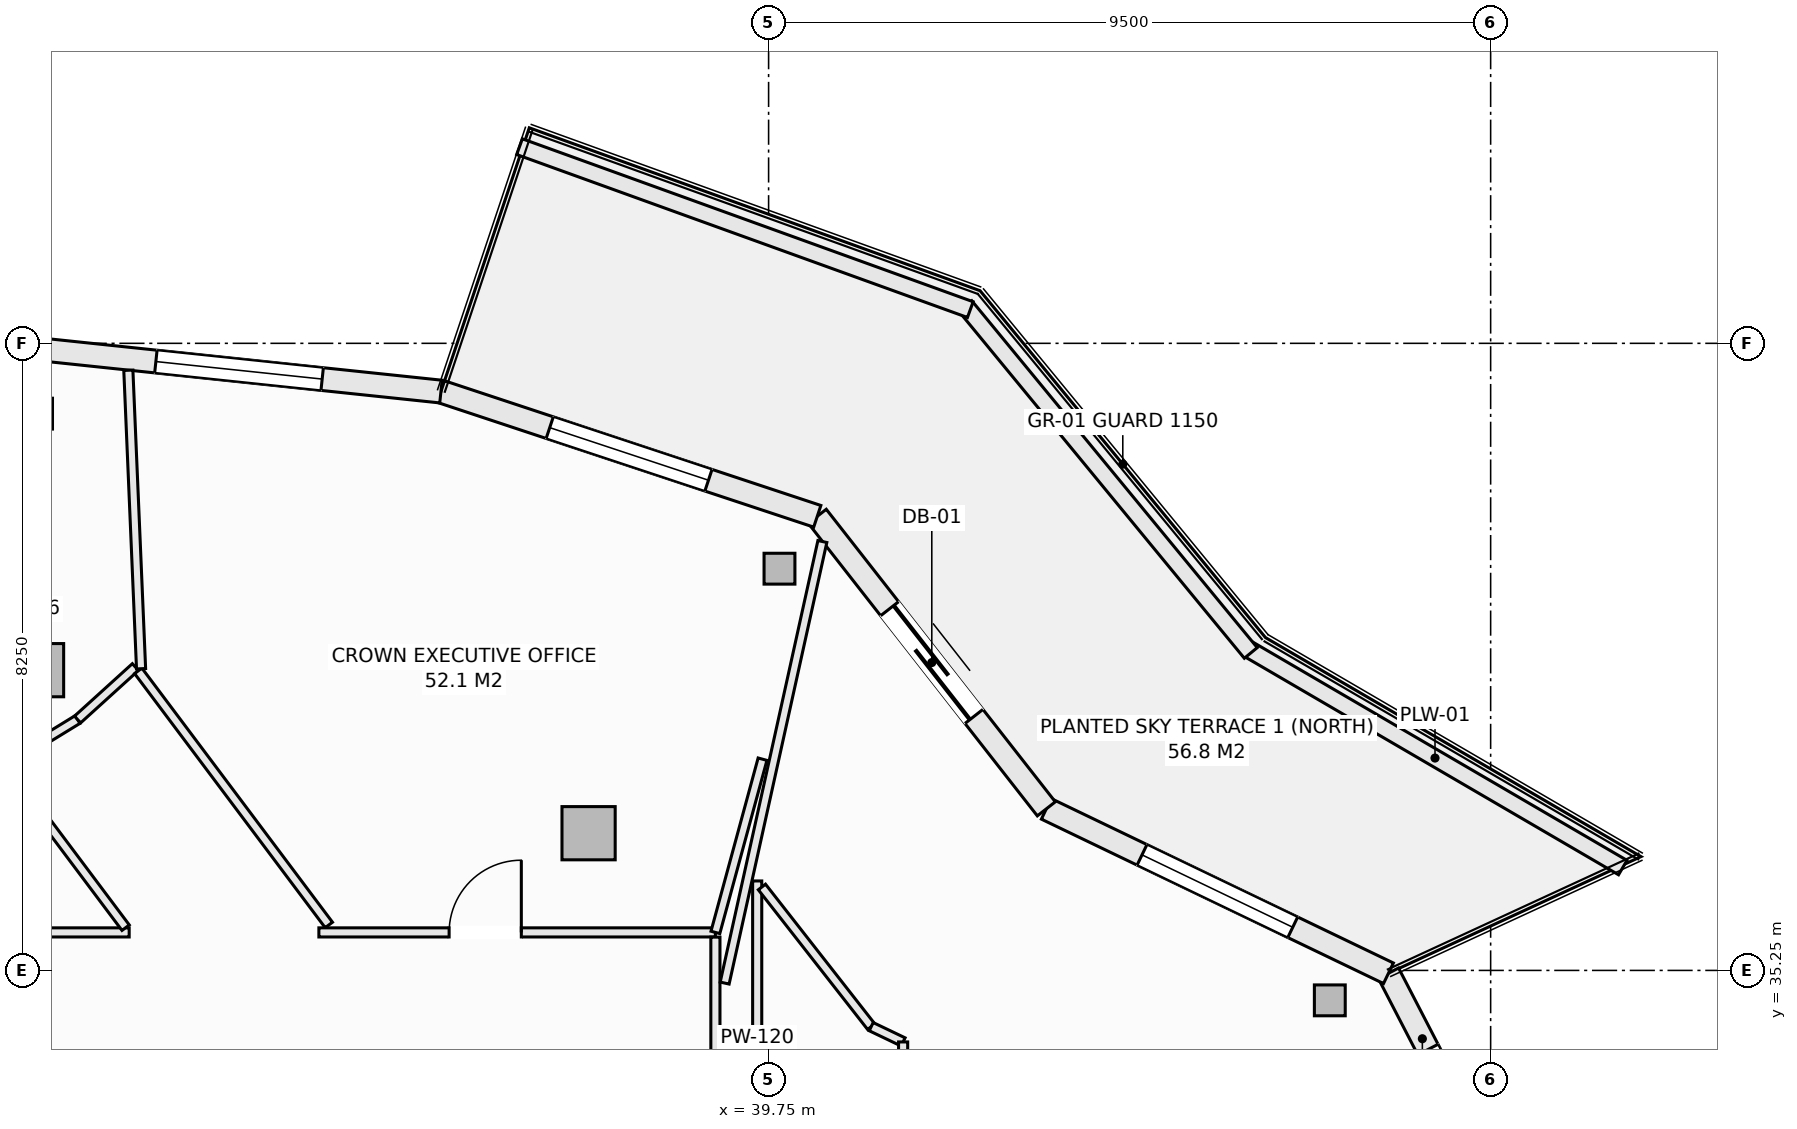
"""IFC4 building model, lengths in metres.
Left out: names, types, materials, properties, quantities, classifications, styles, units other than length and angle.
Written with IfcOpenShell. Run it as: python <this file> out.ifc"""

import sys

from ifc_helpers import new_model, si_unit, direction, frame, frame_2d, origin, origin_2d, place, context, subcontext, project, spatial, rectangle, hollow_rectangle, extrude, element, fill, save


model = new_model("IFC4")
c1 = context("Model", 3, precision=1e-05, world=origin(), true_north=direction((0.0, 1.0)))
c2 = subcontext(c1, "Body", "Model", "MODEL_VIEW")
j1 = project(units=[si_unit("LENGTHUNIT", "METRE"), si_unit("PLANEANGLEUNIT", "RADIAN")], contexts=[c1])
p1 = place(None, origin())
s1 = spatial("IfcSite", under=j1, at=p1, CompositionType="ELEMENT")
p2 = place(p1, origin())
s2 = spatial("IfcBuilding", under=s1, at=p2, CompositionType="ELEMENT")
p3 = place(p2, frame((0.0, 0.0, 262.4)))
s3 = spatial("IfcBuildingStorey", under=s2, at=p3, CompositionType="ELEMENT", Elevation=262.4)
for number, where, z_axis, x_axis in (
    (1, (47.134, 34.856, -0.27), (0.0, 0.0, 1.0), (1.0, 0.0, 0.0)),
    (2, (39.893, 40.535, -0.27), (0.0, 0.0, 1.0), (1.0, 0.0, 0.0)),
    (3, (30.125, 42.575, -0.27), (0.0, 0.0, 1.0), (1.0, 0.0, 0.0)),
):
    element("IfcColumn", number, at=place(p3, frame(where, z_axis=z_axis, x_axis=x_axis)), inside=s3, PredefinedType="COLUMN", context=c2, shape_type="SweptSolid", body=[
        extrude(hollow_rectangle(XDim=0.406, YDim=0.406, WallThickness=0.016, at=origin_2d()), origin(), (0.0, 0.0, 1.0), 3.3),
    ])
for number, where, z_axis, x_axis in (
    (4, (37.382, 37.055, -0.27), (0.0, 0.0, 1.0), (1.0, 0.0, 0.0)),
    (5, (30.125, 39.2, -0.27), (0.0, 0.0, 1.0), (1.0, 0.0, 0.0)),
):
    element("IfcColumn", number, at=place(p3, frame(where, z_axis=z_axis, x_axis=x_axis)), inside=s3, PredefinedType="COLUMN", context=c2, shape_type="SweptSolid", body=[
        extrude(rectangle(XDim=0.7, YDim=0.7, at=origin_2d()), origin(), (0.0, 0.0, 1.0), 3.3),
    ])
p4 = place(p3, frame((47.906, 35.212, 0.0), z_axis=(0.0, 0.0, 1.0), x_axis=(0.459801070243, -0.888021945564, 0.0)))
e6 = element("IfcWall", 6, at=p4, inside=s3, PredefinedType="SOLIDWALL", context=c2, shape_type="SweptSolid", body=[
    extrude(rectangle(XDim=4.461, YDim=0.3, at=frame_2d((2.23, 0.0))), origin(), (0.0, 0.0, 1.0), 2.605),
])
p5 = place(p4, frame((1.13, 0.0, 0.72)))
e7 = element("IfcOpeningElement", 7, at=p5, cuts=e6, PredefinedType="OPENING", context=c2, shape_type="SweptSolid", body=[
    extrude(rectangle(XDim=2.2, YDim=1.65, at=frame_2d((1.1, 0.825))), frame((0.0, 0.16, 0.0), z_axis=(0.0, -1.0, 0.0), x_axis=(1.0, 0.0, 0.0)), (0.0, 0.0, 1.0), 0.32),
])
p6 = place(p3, frame((43.404, 37.375, 0.0), z_axis=(0.0, 0.0, 1.0), x_axis=(0.901346013132, -0.433099716706, 0.0)))
e8 = element("IfcWall", 8, at=p6, inside=s3, PredefinedType="SOLIDWALL", context=c2, shape_type="SweptSolid", body=[
    extrude(rectangle(XDim=4.994, YDim=0.3, at=frame_2d((2.497, 0.0))), origin(), (0.0, 0.0, 1.0), 2.605),
])
p7 = place(p6, frame((1.397, 0.0, 0.72)))
e9 = element("IfcOpeningElement", 9, at=p7, cuts=e8, PredefinedType="OPENING", context=c2, shape_type="SweptSolid", body=[
    extrude(rectangle(XDim=2.2, YDim=1.65, at=frame_2d((1.1, 0.825))), frame((0.0, 0.16, 0.0), z_axis=(0.0, -1.0, 0.0), x_axis=(1.0, 0.0, 0.0)), (0.0, 0.0, 1.0), 0.32),
])
p8 = place(p3, frame((40.391, 41.225, 0.0), z_axis=(0.0, 0.0, 1.0), x_axis=(0.616413297421, -0.78742278781, 0.0)))
e10 = element("IfcWall", 10, at=p8, inside=s3, PredefinedType="SOLIDWALL", context=c2, shape_type="SweptSolid", body=[
    extrude(rectangle(XDim=4.888, YDim=0.3, at=frame_2d((2.444, 0.0))), origin(), (0.0, 0.0, 1.0), 2.605),
])
p9 = place(p8, frame((1.544, 0.0, 0.0)))
e11 = element("IfcOpeningElement", 11, at=p9, cuts=e10, PredefinedType="OPENING", context=c2, shape_type="SweptSolid", body=[
    extrude(rectangle(XDim=1.8, YDim=2.25, at=frame_2d((0.9, 1.125))), frame((0.0, 0.16, 0.0), z_axis=(0.0, -1.0, 0.0), x_axis=(1.0, 0.0, 0.0)), (0.0, 0.0, 1.0), 0.32),
])
p10 = place(p3, frame((35.439, 42.865, 0.0), z_axis=(0.0, 0.0, 1.0), x_axis=(0.949252744709, -0.314514271001, 0.0)))
e12 = element("IfcWall", 12, at=p10, inside=s3, PredefinedType="SOLIDWALL", context=c2, shape_type="SweptSolid", body=[
    extrude(rectangle(XDim=5.216, YDim=0.3, at=frame_2d((2.608, 0.0))), origin(), (0.0, 0.0, 1.0), 2.605),
])
p11 = place(p10, frame((1.508, 0.0, 0.72)))
e13 = element("IfcOpeningElement", 13, at=p11, cuts=e12, PredefinedType="OPENING", context=c2, shape_type="SweptSolid", body=[
    extrude(rectangle(XDim=2.2, YDim=1.65, at=frame_2d((1.1, 0.825))), frame((0.0, 0.16, 0.0), z_axis=(0.0, -1.0, 0.0), x_axis=(1.0, 0.0, 0.0)), (0.0, 0.0, 1.0), 0.32),
])
p12 = place(p3, frame((30.125, 43.425, 0.0), z_axis=(0.0, 0.0, 1.0), x_axis=(0.9944966869, -0.104768028258, 0.0)))
e14 = element("IfcWall", 14, at=p12, inside=s3, PredefinedType="SOLIDWALL", context=c2, shape_type="SweptSolid", body=[
    extrude(rectangle(XDim=5.343, YDim=0.3, at=frame_2d((2.672, 0.0))), origin(), (0.0, 0.0, 1.0), 2.605),
])
p13 = place(p12, frame((1.572, 0.0, 0.72)))
e15 = element("IfcOpeningElement", 15, at=p13, cuts=e14, PredefinedType="OPENING", context=c2, shape_type="SweptSolid", body=[
    extrude(rectangle(XDim=2.2, YDim=1.65, at=frame_2d((1.1, 0.825))), frame((0.0, 0.16, 0.0), z_axis=(0.0, -1.0, 0.0), x_axis=(1.0, 0.0, 0.0)), (0.0, 0.0, 1.0), 0.32),
])
p14 = place(p3, frame((46.048, 39.485, 0.0), z_axis=(0.0, 0.0, 1.0), x_axis=(0.863803671285, -0.503828559606, 0.0)))
e16 = element("IfcWall", 16, at=p14, inside=s3, PredefinedType="PARAPET", context=c2, shape_type="SweptSolid", body=[
    extrude(rectangle(XDim=5.719, YDim=0.22, at=frame_2d((2.86, 0.0))), origin(), (0.0, 0.0, 1.0), 0.52),
])
p15 = place(p3, frame((42.339, 43.99, 0.0), z_axis=(0.0, 0.0, 1.0), x_axis=(0.635450933862, -0.772141250455, 0.0)))
e17 = element("IfcWall", 17, at=p15, inside=s3, PredefinedType="PARAPET", context=c2, shape_type="SweptSolid", body=[
    extrude(rectangle(XDim=5.91, YDim=0.22, at=frame_2d((2.955, 0.0))), origin(), (0.0, 0.0, 1.0), 0.52),
])
p16 = place(p3, frame((36.473, 46.087, 0.0), z_axis=(0.0, 0.0, 1.0), x_axis=(0.940465240036, -0.339889882585, 0.0)))
e18 = element("IfcWall", 18, at=p16, inside=s3, PredefinedType="PARAPET", context=c2, shape_type="SweptSolid", body=[
    extrude(rectangle(XDim=6.307, YDim=0.22, at=frame_2d((3.153, 0.0))), origin(), (0.0, 0.0, 1.0), 0.52),
])
p17 = place(p3, frame((29.96, 38.123, 0.0), z_axis=(0.0, 0.0, 1.0), x_axis=(0.852506956574, 0.522715877885, 0.0)))
e19 = element("IfcWall", 19, at=p17, inside=s3, PredefinedType="PARTITIONING", context=c2, shape_type="SweptSolid", body=[
    extrude(rectangle(XDim=0.819, YDim=0.12, at=frame_2d((0.409, 0.0))), origin(), (0.0, 0.0, 1.0), 3.03),
])
p18 = place(p3, frame((30.658, 38.551, 0.0), z_axis=(0.0, 0.0, 1.0), x_axis=(0.74084279818, 0.671678456097, 0.0)))
e20 = element("IfcWall", 20, at=p18, inside=s3, PredefinedType="PARTITIONING", context=c2, shape_type="SweptSolid", body=[
    extrude(rectangle(XDim=1.027, YDim=0.12, at=frame_2d((0.514, 0.0))), origin(), (0.0, 0.0, 1.0), 3.03),
])
p19 = place(p3, frame((31.456, 39.191, 0.0), z_axis=(0.0, 0.0, 1.0), x_axis=(0.600056078533, -0.799957938029, 0.0)))
e21 = element("IfcWall", 21, at=p19, inside=s3, PredefinedType="PARTITIONING", context=c2, shape_type="SweptSolid", body=[
    extrude(rectangle(XDim=4.179, YDim=0.12, at=frame_2d((2.09, 0.0))), origin(), (0.0, 0.0, 1.0), 2.478),
])
p20 = place(p3, frame((30.062, 35.75, 0.0), z_axis=(0.0, 0.0, 1.0), x_axis=(1.0, 0.0, 0.0)))
e22 = element("IfcWall", 22, at=p20, inside=s3, PredefinedType="PARTITIONING", context=c2, shape_type="SweptSolid", body=[
    extrude(rectangle(XDim=1.275, YDim=0.12, at=frame_2d((0.637, 0.0))), origin(), (0.0, 0.0, 1.0), 3.03),
])
p21 = place(p3, frame((33.833, 35.75, 0.0), z_axis=(0.0, 0.0, 1.0), x_axis=(1.0, 0.0, 0.0)))
e23 = element("IfcWall", 23, at=p21, inside=s3, PredefinedType="PARTITIONING", context=c2, shape_type="SweptSolid", body=[
    extrude(rectangle(XDim=5.217, YDim=0.12, at=frame_2d((2.608, 0.0))), origin(), (0.0, 0.0, 1.0), 2.478),
])
p22 = place(p21, frame((1.713, 0.0, 0.0)))
e24 = element("IfcOpeningElement", 24, at=p22, cuts=e23, PredefinedType="OPENING", context=c2, shape_type="SweptSolid", body=[
    extrude(rectangle(XDim=0.95, YDim=2.1, at=frame_2d((0.475, 1.05))), frame((0.0, 0.07, 0.0), z_axis=(0.0, -1.0, 0.0), x_axis=(1.0, 0.0, 0.0)), (0.0, 0.0, 1.0), 0.14),
])
p23 = place(p3, frame((39.05, 33.75, 0.0), z_axis=(0.0, 0.0, 1.0), x_axis=(0.0, 1.0, 0.0)))
e25 = element("IfcWall", 25, at=p23, inside=s3, PredefinedType="PARTITIONING", context=c2, shape_type="SweptSolid", body=[
    extrude(rectangle(XDim=1.938, YDim=0.12, at=frame_2d((0.969, 0.0))), origin(), (0.0, 0.0, 1.0), 3.03),
])
p24 = place(p3, frame((39.6, 31.197, 0.0), z_axis=(0.0, 0.0, 1.0), x_axis=(0.0, 1.0, 0.0)))
e26 = element("IfcWall", 26, at=p24, inside=s3, PredefinedType="PARTITIONING", context=c2, shape_type="SweptSolid", body=[
    extrude(rectangle(XDim=5.23, YDim=0.12, at=frame_2d((2.615, 0.0))), origin(), (0.0, 0.0, 1.0), 3.03),
])
p25 = place(p3, frame((39.662, 36.348, 0.0), z_axis=(0.0, 0.0, 1.0), x_axis=(0.616212345115, -0.78758005671, 0.0)))
e27 = element("IfcWall", 27, at=p25, inside=s3, PredefinedType="PARTITIONING", context=c2, shape_type="SweptSolid", body=[
    extrude(rectangle(XDim=2.333, YDim=0.12, at=frame_2d((1.167, 0.0))), origin(), (0.0, 0.0, 1.0), 3.03),
])
p26 = place(p3, frame((41.1, 34.51, 0.0), z_axis=(0.0, 0.0, 1.0), x_axis=(0.902054328377, -0.431622507125, 0.0)))
e28 = element("IfcWall", 28, at=p26, inside=s3, PredefinedType="PARTITIONING", context=c2, shape_type="SweptSolid", body=[
    extrude(rectangle(XDim=0.466, YDim=0.12, at=frame_2d((0.233, 0.0))), origin(), (0.0, 0.0, 1.0), 3.03),
])
p27 = place(p3, frame((41.52, 33.193, 0.0), z_axis=(0.0, 0.0, 1.0), x_axis=(0.0, 1.0, 0.0)))
e29 = element("IfcWall", 29, at=p27, inside=s3, PredefinedType="PARTITIONING", context=c2, shape_type="SweptSolid", body=[
    extrude(rectangle(XDim=1.116, YDim=0.12, at=frame_2d((0.558, 0.0))), origin(), (0.0, 0.0, 1.0), 3.03),
])
p28 = place(p3, frame((30.062, 37.451, 0.0), z_axis=(0.0, 0.0, 1.0), x_axis=(0.599790195836, -0.800157310145, 0.0)))
e30 = element("IfcWall", 30, at=p28, inside=s3, PredefinedType="PARTITIONING", context=c2, shape_type="SweptSolid", body=[
    extrude(rectangle(XDim=2.048, YDim=0.12, at=frame_2d((1.024, 0.0))), origin(), (0.0, 0.0, 1.0), 3.03),
])
p29 = place(p3, frame((39.172, 35.083, 0.0), z_axis=(0.0, 0.0, 1.0), x_axis=(0.216048361883, 0.976382663369, 0.0)))
e31 = element("IfcWall", 31, at=p29, inside=s3, PredefinedType="PARTITIONING", context=c2, shape_type="SweptSolid", body=[
    extrude(rectangle(XDim=5.95, YDim=0.12, at=frame_2d((2.975, 0.0))), origin(), (0.0, 0.0, 1.0), 3.03),
])
p30 = place(p3, frame((39.05, 35.75, 0.0), z_axis=(0.0, 0.0, 1.0), x_axis=(0.262548848822, 0.964918702266, 0.0)))
e32 = element("IfcWall", 32, at=p30, inside=s3, PredefinedType="PARTITIONING", context=c2, shape_type="SweptSolid", body=[
    extrude(rectangle(XDim=2.362, YDim=0.12, at=frame_2d((1.181, 0.0))), origin(), (0.0, 0.0, 1.0), 3.03),
])
p31 = place(p3, frame((31.326, 43.146, 0.0), z_axis=(0.0, 0.0, 1.0), x_axis=(0.042550336493, -0.999094324308, 0.0)))
e33 = element("IfcWall", 33, at=p31, inside=s3, PredefinedType="PARTITIONING", context=c2, shape_type="SweptSolid", body=[
    extrude(rectangle(XDim=3.93, YDim=0.12, at=frame_2d((1.965, 0.0))), origin(), (0.0, 0.0, 1.0), 3.03),
])
p32 = place(p5, origin())
e34 = element("IfcWindow", 34, at=p32, inside=s3, PartitioningType="SINGLE_PANEL", PredefinedType="WINDOW", context=c2, shape_type="SweptSolid", body=[
    extrude(rectangle(XDim=2.2, YDim=1.65, at=frame_2d((1.1, 0.825))), frame((0.0, 0.03, 0.0), z_axis=(0.0, -1.0, 0.0), x_axis=(1.0, 0.0, 0.0)), (0.0, 0.0, 1.0), 0.06),
])
fill(e7, e34)
p33 = place(p7, origin())
e35 = element("IfcWindow", 35, at=p33, inside=s3, PartitioningType="SINGLE_PANEL", PredefinedType="WINDOW", context=c2, shape_type="SweptSolid", body=[
    extrude(rectangle(XDim=2.2, YDim=1.65, at=frame_2d((1.1, 0.825))), frame((0.0, 0.03, 0.0), z_axis=(0.0, -1.0, 0.0), x_axis=(1.0, 0.0, 0.0)), (0.0, 0.0, 1.0), 0.06),
])
fill(e9, e35)
p34 = place(p9, origin())
e36 = element("IfcDoor", 36, at=p34, inside=s3, OperationType="SLIDING_TO_LEFT", PredefinedType="DOOR", context=c2, shape_type="SweptSolid", body=[
    extrude(rectangle(XDim=1.8, YDim=2.25, at=frame_2d((0.9, 1.125))), frame((0.0, 0.025, 0.0), z_axis=(0.0, -1.0, 0.0), x_axis=(1.0, 0.0, 0.0)), (0.0, 0.0, 1.0), 0.05),
])
fill(e11, e36)
p35 = place(p11, origin())
e37 = element("IfcWindow", 37, at=p35, inside=s3, PartitioningType="SINGLE_PANEL", PredefinedType="WINDOW", context=c2, shape_type="SweptSolid", body=[
    extrude(rectangle(XDim=2.2, YDim=1.65, at=frame_2d((1.1, 0.825))), frame((0.0, 0.03, 0.0), z_axis=(0.0, -1.0, 0.0), x_axis=(1.0, 0.0, 0.0)), (0.0, 0.0, 1.0), 0.06),
])
fill(e13, e37)
p36 = place(p13, origin())
e38 = element("IfcWindow", 38, at=p36, inside=s3, PartitioningType="SINGLE_PANEL", PredefinedType="WINDOW", context=c2, shape_type="SweptSolid", body=[
    extrude(rectangle(XDim=2.2, YDim=1.65, at=frame_2d((1.1, 0.825))), frame((0.0, 0.03, 0.0), z_axis=(0.0, -1.0, 0.0), x_axis=(1.0, 0.0, 0.0)), (0.0, 0.0, 1.0), 0.06),
])
fill(e15, e38)
p37 = place(p22, origin())
e39 = element("IfcDoor", 39, at=p37, inside=s3, OperationType="SINGLE_SWING_RIGHT", PredefinedType="DOOR", context=c2, shape_type="SweptSolid", body=[
    extrude(rectangle(XDim=0.95, YDim=2.1, at=frame_2d((0.475, 1.05))), frame((0.0, 0.025, 0.0), z_axis=(0.0, -1.0, 0.0), x_axis=(1.0, 0.0, 0.0)), (0.0, 0.0, 1.0), 0.05),
])
fill(e24, e39)
save(model, sys.argv[1])
